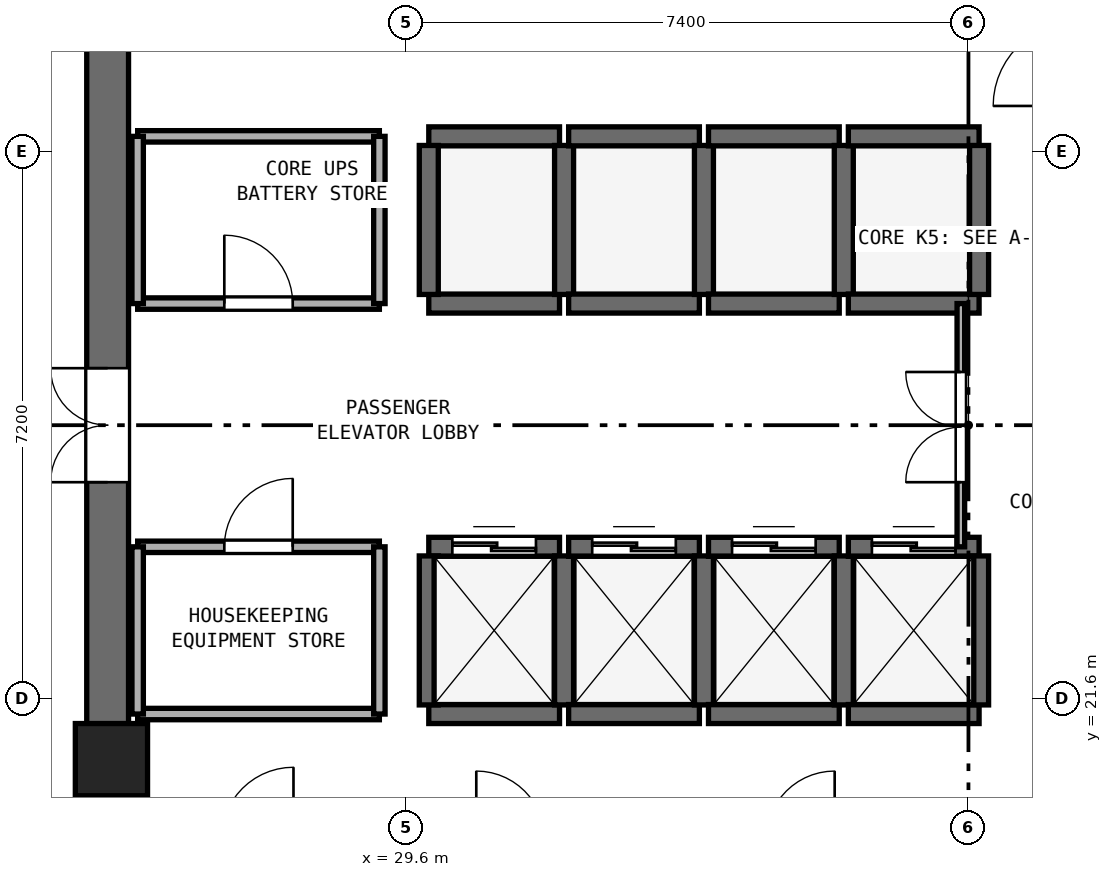
"""IFC4 building model, lengths in metres.
Left out: names, types, materials, properties, quantities, classifications, styles, units other than length and angle.
Written with IfcOpenShell. Run it as: python <this file> out.ifc"""

import sys

from ifc_helpers import new_model, si_unit, direction, frame, frame_2d, origin, origin_2d, place, context, subcontext, project, spatial, rectangle, extrude, element, fill, save


model = new_model("IFC4")
c1 = context("Model", 3, precision=1e-05, world=origin(), true_north=direction((0.0, 1.0)))
c2 = subcontext(c1, "Body", "Model", "MODEL_VIEW")
j1 = project(units=[si_unit("LENGTHUNIT", "METRE"), si_unit("PLANEANGLEUNIT", "RADIAN")], contexts=[c1])
p1 = place(None, origin())
s1 = spatial("IfcSite", under=j1, at=p1, CompositionType="ELEMENT")
p2 = place(p1, origin())
s2 = spatial("IfcBuilding", under=s1, at=p2, CompositionType="ELEMENT")
p3 = place(p2, frame((0.0, 0.0, 163.0)))
s3 = spatial("IfcBuildingStorey", under=s2, at=p3, CompositionType="ELEMENT", Elevation=163.0)
p4 = place(p3, frame((25.675, 17.55, 0.0), z_axis=(0.0, 0.0, 1.0), x_axis=(0.0, 1.0, 0.0)))
e1 = element("IfcWall", 1, at=p4, inside=s3, PredefinedType="SHEAR", context=c2, shape_type="SweptSolid", body=[
    extrude(rectangle(XDim=15.3, YDim=0.55, at=frame_2d((7.65, 0.0))), origin(), (0.0, 0.0, 1.0), 3.54),
])
p5 = place(p4, frame((6.9, 0.0, 0.0)))
e2 = element("IfcOpeningElement", 2, at=p5, cuts=e1, PredefinedType="OPENING", context=c2, shape_type="SweptSolid", body=[
    extrude(rectangle(XDim=1.5, YDim=2.15, at=frame_2d((0.75, 1.075))), frame((0.0, 0.285, 0.0), z_axis=(0.0, -1.0, 0.0), x_axis=(1.0, 0.0, 0.0)), (0.0, 0.0, 1.0), 0.57),
])
p6 = place(p3, frame((25.725, 20.8, 0.0), z_axis=(0.0, 0.0, 1.0), x_axis=(1.0, 0.0, 0.0)))
e3 = element("IfcColumn", 3, at=p6, inside=s3, PredefinedType="PILASTER", context=c2, shape_type="SweptSolid", body=[
    extrude(rectangle(XDim=0.95, YDim=0.95, at=origin_2d()), origin(), (0.0, 0.0, 1.0), 3.8),
])
p7 = place(p3, frame((29.9, 21.4, 0.0), z_axis=(0.0, 0.0, 1.0), x_axis=(1.0, 0.0, 0.0)))
e4 = element("IfcWall", 4, at=p7, inside=s3, PredefinedType="SHEAR", context=c2, shape_type="SweptSolid", body=[
    extrude(rectangle(XDim=1.72, YDim=0.25, at=frame_2d((0.86, 0.0))), origin(), (0.0, 0.0, 1.0), 3.54),
])
p8 = place(p3, frame((29.9, 23.6, 0.0), z_axis=(0.0, 0.0, 1.0), x_axis=(1.0, 0.0, 0.0)))
e5 = element("IfcWall", 5, at=p8, inside=s3, PredefinedType="SHEAR", context=c2, shape_type="SweptSolid", body=[
    extrude(rectangle(XDim=1.72, YDim=0.25, at=frame_2d((0.86, 0.0))), origin(), (0.0, 0.0, 1.0), 3.54),
])
p9 = place(p8, frame((0.31, 0.0, 0.0)))
e6 = element("IfcOpeningElement", 6, at=p9, cuts=e5, PredefinedType="OPENING", context=c2, shape_type="SweptSolid", body=[
    extrude(rectangle(XDim=1.1, YDim=2.15, at=frame_2d((0.55, 1.075))), frame((0.0, 0.135, 0.0), z_axis=(0.0, -1.0, 0.0), x_axis=(1.0, 0.0, 0.0)), (0.0, 0.0, 1.0), 0.27),
])
for number, where, z_axis, x_axis in (
    (7, (29.9, 21.52, 0.0), (0.0, 0.0, 1.0), (0.0, 1.0, 0.0)),
    (8, (31.68, 21.52, 0.0), (0.0, 0.0, 1.0), (0.0, 1.0, 0.0)),
):
    element("IfcWall", number, at=place(p3, frame(where, z_axis=z_axis, x_axis=x_axis)), inside=s3, PredefinedType="SHEAR", context=c2, shape_type="SweptSolid", body=[
        extrude(rectangle(XDim=1.96, YDim=0.25, at=frame_2d((0.98, 0.0))), origin(), (0.0, 0.0, 1.0), 3.54),
    ])
p10 = place(p3, frame((31.74, 21.4, 0.0), z_axis=(0.0, 0.0, 1.0), x_axis=(1.0, 0.0, 0.0)))
e9 = element("IfcWall", 9, at=p10, inside=s3, PredefinedType="SHEAR", context=c2, shape_type="SweptSolid", body=[
    extrude(rectangle(XDim=1.72, YDim=0.25, at=frame_2d((0.86, 0.0))), origin(), (0.0, 0.0, 1.0), 3.54),
])
p11 = place(p3, frame((31.74, 23.6, 0.0), z_axis=(0.0, 0.0, 1.0), x_axis=(1.0, 0.0, 0.0)))
e10 = element("IfcWall", 10, at=p11, inside=s3, PredefinedType="SHEAR", context=c2, shape_type="SweptSolid", body=[
    extrude(rectangle(XDim=1.72, YDim=0.25, at=frame_2d((0.86, 0.0))), origin(), (0.0, 0.0, 1.0), 3.54),
])
p12 = place(p11, frame((0.31, 0.0, 0.0)))
e11 = element("IfcOpeningElement", 11, at=p12, cuts=e10, PredefinedType="OPENING", context=c2, shape_type="SweptSolid", body=[
    extrude(rectangle(XDim=1.1, YDim=2.15, at=frame_2d((0.55, 1.075))), frame((0.0, 0.135, 0.0), z_axis=(0.0, -1.0, 0.0), x_axis=(1.0, 0.0, 0.0)), (0.0, 0.0, 1.0), 0.27),
])
p13 = place(p3, frame((33.52, 21.52, 0.0), z_axis=(0.0, 0.0, 1.0), x_axis=(0.0, 1.0, 0.0)))
e12 = element("IfcWall", 12, at=p13, inside=s3, PredefinedType="SHEAR", context=c2, shape_type="SweptSolid", body=[
    extrude(rectangle(XDim=1.96, YDim=0.25, at=frame_2d((0.98, 0.0))), origin(), (0.0, 0.0, 1.0), 3.54),
])
p14 = place(p3, frame((33.58, 21.4, 0.0), z_axis=(0.0, 0.0, 1.0), x_axis=(1.0, 0.0, 0.0)))
e13 = element("IfcWall", 13, at=p14, inside=s3, PredefinedType="SHEAR", context=c2, shape_type="SweptSolid", body=[
    extrude(rectangle(XDim=1.72, YDim=0.25, at=frame_2d((0.86, 0.0))), origin(), (0.0, 0.0, 1.0), 3.54),
])
p15 = place(p3, frame((33.58, 23.6, 0.0), z_axis=(0.0, 0.0, 1.0), x_axis=(1.0, 0.0, 0.0)))
e14 = element("IfcWall", 14, at=p15, inside=s3, PredefinedType="SHEAR", context=c2, shape_type="SweptSolid", body=[
    extrude(rectangle(XDim=1.72, YDim=0.25, at=frame_2d((0.86, 0.0))), origin(), (0.0, 0.0, 1.0), 3.54),
])
p16 = place(p15, frame((0.31, 0.0, 0.0)))
e15 = element("IfcOpeningElement", 15, at=p16, cuts=e14, PredefinedType="OPENING", context=c2, shape_type="SweptSolid", body=[
    extrude(rectangle(XDim=1.1, YDim=2.15, at=frame_2d((0.55, 1.075))), frame((0.0, 0.135, 0.0), z_axis=(0.0, -1.0, 0.0), x_axis=(1.0, 0.0, 0.0)), (0.0, 0.0, 1.0), 0.27),
])
p17 = place(p3, frame((35.36, 21.52, 0.0), z_axis=(0.0, 0.0, 1.0), x_axis=(0.0, 1.0, 0.0)))
e16 = element("IfcWall", 16, at=p17, inside=s3, PredefinedType="SHEAR", context=c2, shape_type="SweptSolid", body=[
    extrude(rectangle(XDim=1.96, YDim=0.25, at=frame_2d((0.98, 0.0))), origin(), (0.0, 0.0, 1.0), 3.54),
])
p18 = place(p3, frame((35.42, 21.4, 0.0), z_axis=(0.0, 0.0, 1.0), x_axis=(1.0, 0.0, 0.0)))
e17 = element("IfcWall", 17, at=p18, inside=s3, PredefinedType="SHEAR", context=c2, shape_type="SweptSolid", body=[
    extrude(rectangle(XDim=1.72, YDim=0.25, at=frame_2d((0.86, 0.0))), origin(), (0.0, 0.0, 1.0), 3.54),
])
p19 = place(p3, frame((35.42, 23.6, 0.0), z_axis=(0.0, 0.0, 1.0), x_axis=(1.0, 0.0, 0.0)))
e18 = element("IfcWall", 18, at=p19, inside=s3, PredefinedType="SHEAR", context=c2, shape_type="SweptSolid", body=[
    extrude(rectangle(XDim=1.72, YDim=0.25, at=frame_2d((0.86, 0.0))), origin(), (0.0, 0.0, 1.0), 3.54),
])
p20 = place(p19, frame((0.31, 0.0, 0.0)))
e19 = element("IfcOpeningElement", 19, at=p20, cuts=e18, PredefinedType="OPENING", context=c2, shape_type="SweptSolid", body=[
    extrude(rectangle(XDim=1.1, YDim=2.15, at=frame_2d((0.55, 1.075))), frame((0.0, 0.135, 0.0), z_axis=(0.0, -1.0, 0.0), x_axis=(1.0, 0.0, 0.0)), (0.0, 0.0, 1.0), 0.27),
])
p21 = place(p3, frame((37.14, 21.52, 0.0), z_axis=(0.0, 0.0, 1.0), x_axis=(0.0, 1.0, 0.0)))
e20 = element("IfcWall", 20, at=p21, inside=s3, PredefinedType="SHEAR", context=c2, shape_type="SweptSolid", body=[
    extrude(rectangle(XDim=1.96, YDim=0.25, at=frame_2d((0.98, 0.0))), origin(), (0.0, 0.0, 1.0), 3.54),
])
for number, where, z_axis, x_axis in (
    (21, (29.9, 26.8, 0.0), (0.0, 0.0, 1.0), (1.0, 0.0, 0.0)),
    (22, (29.9, 29.0, 0.0), (0.0, 0.0, 1.0), (1.0, 0.0, 0.0)),
):
    element("IfcWall", number, at=place(p3, frame(where, z_axis=z_axis, x_axis=x_axis)), inside=s3, PredefinedType="SHEAR", context=c2, shape_type="SweptSolid", body=[
        extrude(rectangle(XDim=1.72, YDim=0.25, at=frame_2d((0.86, 0.0))), origin(), (0.0, 0.0, 1.0), 3.54),
    ])
for number, where, z_axis, x_axis in (
    (23, (29.9, 26.92, 0.0), (0.0, 0.0, 1.0), (0.0, 1.0, 0.0)),
    (24, (31.68, 26.92, 0.0), (0.0, 0.0, 1.0), (0.0, 1.0, 0.0)),
):
    element("IfcWall", number, at=place(p3, frame(where, z_axis=z_axis, x_axis=x_axis)), inside=s3, PredefinedType="SHEAR", context=c2, shape_type="SweptSolid", body=[
        extrude(rectangle(XDim=1.96, YDim=0.25, at=frame_2d((0.98, 0.0))), origin(), (0.0, 0.0, 1.0), 3.54),
    ])
for number, where, z_axis, x_axis in (
    (25, (31.74, 26.8, 0.0), (0.0, 0.0, 1.0), (1.0, 0.0, 0.0)),
    (26, (31.74, 29.0, 0.0), (0.0, 0.0, 1.0), (1.0, 0.0, 0.0)),
):
    element("IfcWall", number, at=place(p3, frame(where, z_axis=z_axis, x_axis=x_axis)), inside=s3, PredefinedType="SHEAR", context=c2, shape_type="SweptSolid", body=[
        extrude(rectangle(XDim=1.72, YDim=0.25, at=frame_2d((0.86, 0.0))), origin(), (0.0, 0.0, 1.0), 3.54),
    ])
p22 = place(p3, frame((33.52, 26.92, 0.0), z_axis=(0.0, 0.0, 1.0), x_axis=(0.0, 1.0, 0.0)))
e27 = element("IfcWall", 27, at=p22, inside=s3, PredefinedType="SHEAR", context=c2, shape_type="SweptSolid", body=[
    extrude(rectangle(XDim=1.96, YDim=0.25, at=frame_2d((0.98, 0.0))), origin(), (0.0, 0.0, 1.0), 3.54),
])
for number, where, z_axis, x_axis in (
    (28, (33.58, 26.8, 0.0), (0.0, 0.0, 1.0), (1.0, 0.0, 0.0)),
    (29, (33.58, 29.0, 0.0), (0.0, 0.0, 1.0), (1.0, 0.0, 0.0)),
):
    element("IfcWall", number, at=place(p3, frame(where, z_axis=z_axis, x_axis=x_axis)), inside=s3, PredefinedType="SHEAR", context=c2, shape_type="SweptSolid", body=[
        extrude(rectangle(XDim=1.72, YDim=0.25, at=frame_2d((0.86, 0.0))), origin(), (0.0, 0.0, 1.0), 3.54),
    ])
p23 = place(p3, frame((35.36, 26.92, 0.0), z_axis=(0.0, 0.0, 1.0), x_axis=(0.0, 1.0, 0.0)))
e30 = element("IfcWall", 30, at=p23, inside=s3, PredefinedType="SHEAR", context=c2, shape_type="SweptSolid", body=[
    extrude(rectangle(XDim=1.96, YDim=0.25, at=frame_2d((0.98, 0.0))), origin(), (0.0, 0.0, 1.0), 3.54),
])
for number, where, z_axis, x_axis in (
    (31, (35.42, 26.8, 0.0), (0.0, 0.0, 1.0), (1.0, 0.0, 0.0)),
    (32, (35.42, 29.0, 0.0), (0.0, 0.0, 1.0), (1.0, 0.0, 0.0)),
):
    element("IfcWall", number, at=place(p3, frame(where, z_axis=z_axis, x_axis=x_axis)), inside=s3, PredefinedType="SHEAR", context=c2, shape_type="SweptSolid", body=[
        extrude(rectangle(XDim=1.72, YDim=0.25, at=frame_2d((0.86, 0.0))), origin(), (0.0, 0.0, 1.0), 3.54),
    ])
p24 = place(p3, frame((37.14, 26.92, 0.0), z_axis=(0.0, 0.0, 1.0), x_axis=(0.0, 1.0, 0.0)))
e33 = element("IfcWall", 33, at=p24, inside=s3, PredefinedType="SHEAR", context=c2, shape_type="SweptSolid", body=[
    extrude(rectangle(XDim=1.96, YDim=0.25, at=frame_2d((0.98, 0.0))), origin(), (0.0, 0.0, 1.0), 3.54),
])
p25 = place(p3, frame((26.07, 26.8, 0.0), z_axis=(0.0, 0.0, 1.0), x_axis=(1.0, 0.0, 0.0)))
e34 = element("IfcWall", 34, at=p25, inside=s3, PredefinedType="PARTITIONING", context=c2, shape_type="SweptSolid", body=[
    extrude(rectangle(XDim=3.18, YDim=0.15, at=frame_2d((1.59, 0.0))), origin(), (0.0, 0.0, 1.0), 3.54),
])
p26 = place(p25, frame((1.14, 0.0, 0.0)))
e35 = element("IfcOpeningElement", 35, at=p26, cuts=e34, PredefinedType="OPENING", context=c2, shape_type="SweptSolid", body=[
    extrude(rectangle(XDim=0.9, YDim=2.1, at=frame_2d((0.45, 1.05))), frame((0.0, 0.085, 0.0), z_axis=(0.0, -1.0, 0.0), x_axis=(1.0, 0.0, 0.0)), (0.0, 0.0, 1.0), 0.17),
])
p27 = place(p3, frame((26.07, 29.0, 0.0), z_axis=(0.0, 0.0, 1.0), x_axis=(1.0, 0.0, 0.0)))
e36 = element("IfcWall", 36, at=p27, inside=s3, PredefinedType="PARTITIONING", context=c2, shape_type="SweptSolid", body=[
    extrude(rectangle(XDim=3.18, YDim=0.15, at=frame_2d((1.59, 0.0))), origin(), (0.0, 0.0, 1.0), 3.54),
])
p28 = place(p3, frame((26.07, 26.8, 0.0), z_axis=(0.0, 0.0, 1.0), x_axis=(0.0, 1.0, 0.0)))
e37 = element("IfcWall", 37, at=p28, inside=s3, PredefinedType="PARTITIONING", context=c2, shape_type="SweptSolid", body=[
    extrude(rectangle(XDim=2.2, YDim=0.15, at=frame_2d((1.1, 0.0))), origin(), (0.0, 0.0, 1.0), 2.64),
])
p29 = place(p3, frame((29.25, 26.8, 0.0), z_axis=(0.0, 0.0, 1.0), x_axis=(0.0, 1.0, 0.0)))
e38 = element("IfcWall", 38, at=p29, inside=s3, PredefinedType="PARTITIONING", context=c2, shape_type="SweptSolid", body=[
    extrude(rectangle(XDim=2.2, YDim=0.15, at=frame_2d((1.1, 0.0))), origin(), (0.0, 0.0, 1.0), 3.54),
])
p30 = place(p3, frame((26.07, 21.4, 0.0), z_axis=(0.0, 0.0, 1.0), x_axis=(1.0, 0.0, 0.0)))
e39 = element("IfcWall", 39, at=p30, inside=s3, PredefinedType="PARTITIONING", context=c2, shape_type="SweptSolid", body=[
    extrude(rectangle(XDim=3.18, YDim=0.15, at=frame_2d((1.59, 0.0))), origin(), (0.0, 0.0, 1.0), 3.54),
])
p31 = place(p3, frame((26.07, 23.6, 0.0), z_axis=(0.0, 0.0, 1.0), x_axis=(1.0, 0.0, 0.0)))
e40 = element("IfcWall", 40, at=p31, inside=s3, PredefinedType="PARTITIONING", context=c2, shape_type="SweptSolid", body=[
    extrude(rectangle(XDim=3.18, YDim=0.15, at=frame_2d((1.59, 0.0))), origin(), (0.0, 0.0, 1.0), 3.54),
])
p32 = place(p31, frame((1.14, 0.0, 0.0)))
e41 = element("IfcOpeningElement", 41, at=p32, cuts=e40, PredefinedType="OPENING", context=c2, shape_type="SweptSolid", body=[
    extrude(rectangle(XDim=0.9, YDim=2.1, at=frame_2d((0.45, 1.05))), frame((0.0, 0.085, 0.0), z_axis=(0.0, -1.0, 0.0), x_axis=(1.0, 0.0, 0.0)), (0.0, 0.0, 1.0), 0.17),
])
p33 = place(p3, frame((26.07, 21.4, 0.0), z_axis=(0.0, 0.0, 1.0), x_axis=(0.0, 1.0, 0.0)))
e42 = element("IfcWall", 42, at=p33, inside=s3, PredefinedType="PARTITIONING", context=c2, shape_type="SweptSolid", body=[
    extrude(rectangle(XDim=2.2, YDim=0.15, at=frame_2d((1.1, 0.0))), origin(), (0.0, 0.0, 1.0), 2.64),
])
p34 = place(p3, frame((29.25, 21.4, 0.0), z_axis=(0.0, 0.0, 1.0), x_axis=(0.0, 1.0, 0.0)))
e43 = element("IfcWall", 43, at=p34, inside=s3, PredefinedType="PARTITIONING", context=c2, shape_type="SweptSolid", body=[
    extrude(rectangle(XDim=2.2, YDim=0.15, at=frame_2d((1.1, 0.0))), origin(), (0.0, 0.0, 1.0), 3.54),
])
p35 = place(p3, frame((36.9, 23.6, 0.0), z_axis=(0.0, 0.0, 1.0), x_axis=(0.0, 1.0, 0.0)))
e44 = element("IfcWall", 44, at=p35, inside=s3, PredefinedType="PARTITIONING", context=c2, shape_type="SweptSolid", body=[
    extrude(rectangle(XDim=3.2, YDim=0.1, at=frame_2d((1.6, 0.0))), origin(), (0.0, 0.0, 1.0), 3.54),
])
p36 = place(p35, frame((0.85, 0.0, 0.0)))
e45 = element("IfcOpeningElement", 45, at=p36, cuts=e44, PredefinedType="OPENING", context=c2, shape_type="SweptSolid", body=[
    extrude(rectangle(XDim=1.45, YDim=2.12, at=frame_2d((0.725, 1.06))), frame((0.0, 0.06, 0.0), z_axis=(0.0, -1.0, 0.0), x_axis=(1.0, 0.0, 0.0)), (0.0, 0.0, 1.0), 0.12),
])
p37 = place(p9, origin())
e46 = element("IfcDoor", 46, at=p37, inside=s3, OperationType="DOUBLE_DOOR_SLIDING", PredefinedType="DOOR", context=c2, shape_type="SweptSolid", body=[
    extrude(rectangle(XDim=1.1, YDim=2.15, at=frame_2d((0.55, 1.075))), frame((0.0, 0.025, 0.0), z_axis=(0.0, -1.0, 0.0), x_axis=(1.0, 0.0, 0.0)), (0.0, 0.0, 1.0), 0.05),
])
fill(e6, e46)
p38 = place(p12, origin())
e47 = element("IfcDoor", 47, at=p38, inside=s3, OperationType="DOUBLE_DOOR_SLIDING", PredefinedType="DOOR", context=c2, shape_type="SweptSolid", body=[
    extrude(rectangle(XDim=1.1, YDim=2.15, at=frame_2d((0.55, 1.075))), frame((0.0, 0.025, 0.0), z_axis=(0.0, -1.0, 0.0), x_axis=(1.0, 0.0, 0.0)), (0.0, 0.0, 1.0), 0.05),
])
fill(e11, e47)
p39 = place(p16, origin())
e48 = element("IfcDoor", 48, at=p39, inside=s3, OperationType="DOUBLE_DOOR_SLIDING", PredefinedType="DOOR", context=c2, shape_type="SweptSolid", body=[
    extrude(rectangle(XDim=1.1, YDim=2.15, at=frame_2d((0.55, 1.075))), frame((0.0, 0.025, 0.0), z_axis=(0.0, -1.0, 0.0), x_axis=(1.0, 0.0, 0.0)), (0.0, 0.0, 1.0), 0.05),
])
fill(e15, e48)
p40 = place(p20, origin())
e49 = element("IfcDoor", 49, at=p40, inside=s3, OperationType="DOUBLE_DOOR_SLIDING", PredefinedType="DOOR", context=c2, shape_type="SweptSolid", body=[
    extrude(rectangle(XDim=1.1, YDim=2.15, at=frame_2d((0.55, 1.075))), frame((0.0, 0.025, 0.0), z_axis=(0.0, -1.0, 0.0), x_axis=(1.0, 0.0, 0.0)), (0.0, 0.0, 1.0), 0.05),
])
fill(e19, e49)
p41 = place(p5, origin())
e50 = element("IfcDoor", 50, at=p41, inside=s3, OperationType="DOUBLE_DOOR_SINGLE_SWING", PredefinedType="DOOR", context=c2, shape_type="SweptSolid", body=[
    extrude(rectangle(XDim=1.5, YDim=2.15, at=frame_2d((0.75, 1.075))), frame((0.0, 0.025, 0.0), z_axis=(0.0, -1.0, 0.0), x_axis=(1.0, 0.0, 0.0)), (0.0, 0.0, 1.0), 0.05),
])
fill(e2, e50)
p42 = place(p26, origin())
e51 = element("IfcDoor", 51, at=p42, inside=s3, OperationType="SINGLE_SWING_LEFT", PredefinedType="DOOR", context=c2, shape_type="SweptSolid", body=[
    extrude(rectangle(XDim=0.9, YDim=2.1, at=frame_2d((0.45, 1.05))), frame((0.0, 0.025, 0.0), z_axis=(0.0, -1.0, 0.0), x_axis=(1.0, 0.0, 0.0)), (0.0, 0.0, 1.0), 0.05),
])
fill(e35, e51)
p43 = place(p32, origin())
e52 = element("IfcDoor", 52, at=p43, inside=s3, OperationType="SINGLE_SWING_RIGHT", PredefinedType="DOOR", context=c2, shape_type="SweptSolid", body=[
    extrude(rectangle(XDim=0.9, YDim=2.1, at=frame_2d((0.45, 1.05))), frame((0.0, 0.025, 0.0), z_axis=(0.0, -1.0, 0.0), x_axis=(1.0, 0.0, 0.0)), (0.0, 0.0, 1.0), 0.05),
])
fill(e41, e52)
p44 = place(p36, origin())
e53 = element("IfcDoor", 53, at=p44, inside=s3, OperationType="DOUBLE_DOOR_SINGLE_SWING", PredefinedType="DOOR", context=c2, shape_type="SweptSolid", body=[
    extrude(rectangle(XDim=1.45, YDim=2.12, at=frame_2d((0.725, 1.06))), frame((0.0, 0.025, 0.0), z_axis=(0.0, -1.0, 0.0), x_axis=(1.0, 0.0, 0.0)), (0.0, 0.0, 1.0), 0.05),
])
fill(e45, e53)
save(model, sys.argv[1])
